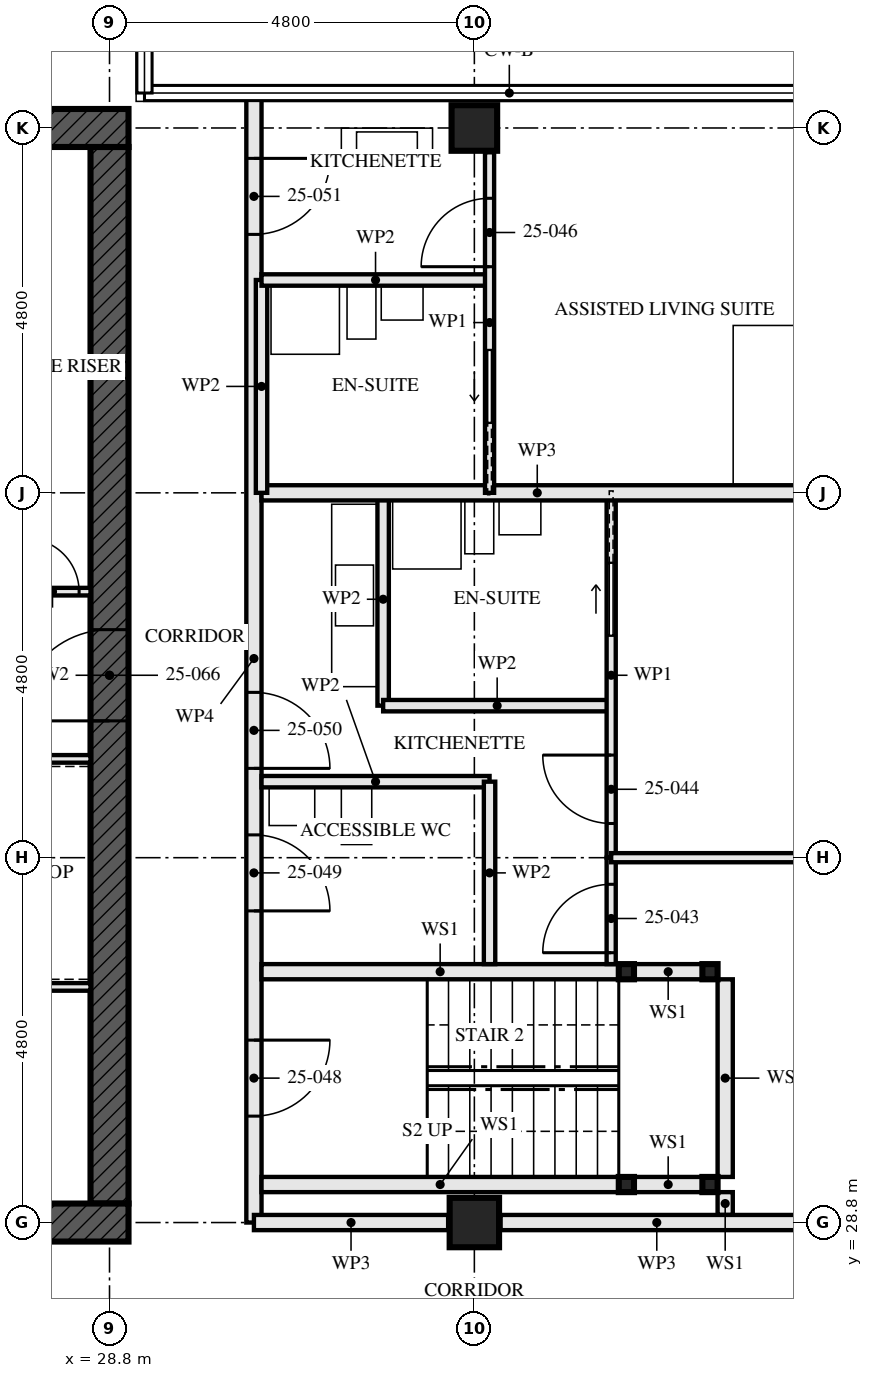
"""IFC4 building model, lengths in metres.
Left out: names, types, materials, properties, quantities, classifications, styles, units other than length and angle.
Written with IfcOpenShell. Run it as: python <this file> out.ifc"""

import sys

from ifc_helpers import new_model, si_unit, direction, frame, frame_2d, origin, origin_2d, place, context, subcontext, project, spatial, rectangle, hollow_rectangle, extrude, element, fill, save


model = new_model("IFC4")
c1 = context("Model", 3, precision=1e-05, world=origin(), true_north=direction((0.0, 1.0)))
c2 = subcontext(c1, "Body", "Model", "MODEL_VIEW")
j1 = project(units=[si_unit("LENGTHUNIT", "METRE"), si_unit("PLANEANGLEUNIT", "RADIAN")], contexts=[c1])
p1 = place(None, origin())
s1 = spatial("IfcSite", under=j1, at=p1, CompositionType="ELEMENT")
p2 = place(p1, origin())
s2 = spatial("IfcBuilding", under=s1, at=p2, CompositionType="ELEMENT")
p3 = place(p2, frame((0.0, 0.0, 94.5)))
s3 = spatial("IfcBuildingStorey", under=s2, at=p3, CompositionType="ELEMENT", Elevation=94.5)
p4 = place(p3, frame((33.6, 28.8, 0.0), z_axis=(0.0, 0.0, 1.0), x_axis=(0.0, 1.0, 0.0)))
e1 = element("IfcColumn", 1, at=p4, inside=s3, PredefinedType="COLUMN", context=c2, shape_type="SweptSolid", body=[
    extrude(hollow_rectangle(XDim=0.65, YDim=0.65, WallThickness=0.05, at=origin_2d()), origin(), (0.0, 0.0, 1.0), 3.5),
])
p5 = place(p3, frame((33.6, 43.2, 0.0), z_axis=(0.0, 0.0, 1.0), x_axis=(0.0, 1.0, 0.0)))
e2 = element("IfcColumn", 2, at=p5, inside=s3, PredefinedType="COLUMN", context=c2, shape_type="SweptSolid", body=[
    extrude(hollow_rectangle(XDim=0.6, YDim=0.6, WallThickness=0.08, at=origin_2d()), origin(), (0.0, 0.0, 1.0), 3.5),
])
p6 = place(p3, frame((14.15, 28.8, -0.17), z_axis=(0.0, 0.0, 1.0), x_axis=(1.0, 0.0, 0.0)))
e3 = element("IfcWall", 3, at=p6, inside=s3, PredefinedType="SHEAR", context=c2, shape_type="SweptSolid", body=[
    extrude(rectangle(XDim=14.9, YDim=0.5, at=frame_2d((7.45, 0.0))), origin(), (0.0, 0.0, 1.0), 3.5),
])
p7 = place(p6, frame((6.85, 0.0, 0.17)))
e4 = element("IfcOpeningElement", 4, at=p7, cuts=e3, PredefinedType="OPENING", context=c2, shape_type="SweptSolid", body=[
    extrude(rectangle(XDim=1.2, YDim=2.1, at=frame_2d((0.6, 1.05))), frame((0.0, 0.26, 0.0), z_axis=(0.0, -1.0, 0.0), x_axis=(1.0, 0.0, 0.0)), (0.0, 0.0, 1.0), 0.521),
])
p8 = place(p3, frame((29.05, 43.2, -0.17), z_axis=(0.0, 0.0, 1.0), x_axis=(-1.0, 0.0, 0.0)))
e5 = element("IfcWall", 5, at=p8, inside=s3, PredefinedType="SHEAR", context=c2, shape_type="SweptSolid", body=[
    extrude(rectangle(XDim=14.9, YDim=0.5, at=frame_2d((7.45, 0.0))), origin(), (0.0, 0.0, 1.0), 3.5),
])
p9 = place(p8, frame((6.85, 0.0, 0.17)))
e6 = element("IfcOpeningElement", 6, at=p9, cuts=e5, PredefinedType="OPENING", context=c2, shape_type="SweptSolid", body=[
    extrude(rectangle(XDim=1.2, YDim=2.1, at=frame_2d((0.6, 1.05))), frame((0.0, 0.26, 0.0), z_axis=(0.0, -1.0, 0.0), x_axis=(1.0, 0.0, 0.0)), (0.0, 0.0, 1.0), 0.521),
])
p10 = place(p3, frame((28.8, 29.05, -0.17), z_axis=(0.0, 0.0, 1.0), x_axis=(0.0, 1.0, 0.0)))
e7 = element("IfcWall", 7, at=p10, inside=s3, PredefinedType="SHEAR", context=c2, shape_type="SweptSolid", body=[
    extrude(rectangle(XDim=13.9, YDim=0.5, at=frame_2d((6.95, 0.0))), origin(), (0.0, 0.0, 1.0), 3.5),
])
p11 = place(p10, frame((6.35, 0.0, 0.17)))
e8 = element("IfcOpeningElement", 8, at=p11, cuts=e7, PredefinedType="OPENING", context=c2, shape_type="SweptSolid", body=[
    extrude(rectangle(XDim=1.2, YDim=2.1, at=frame_2d((0.6, 1.05))), frame((0.0, 0.26, 0.0), z_axis=(0.0, -1.0, 0.0), x_axis=(1.0, 0.0, 0.0)), (0.0, 0.0, 1.0), 0.521),
])
for number, where, z_axis, x_axis in (
    (9, (36.7, 29.3, 0.0), (0.0, 0.0, 1.0), (1.0, 0.0, 0.0)),
    (10, (36.7, 32.1, 0.0), (0.0, 0.0, 1.0), (1.0, 0.0, 0.0)),
    (11, (35.6, 29.3, 0.0), (0.0, 0.0, 1.0), (1.0, 0.0, 0.0)),
    (12, (35.6, 32.1, 0.0), (0.0, 0.0, 1.0), (1.0, 0.0, 0.0)),
):
    element("IfcColumn", number, at=place(p3, frame(where, z_axis=z_axis, x_axis=x_axis)), inside=s3, PredefinedType="COLUMN", context=c2, shape_type="SweptSolid", body=[
        extrude(hollow_rectangle(XDim=0.2, YDim=0.2, WallThickness=0.008, at=origin_2d()), origin(), (0.0, 0.0, 1.0), 3.33),
    ])
p12 = place(p3, frame((36.6, 29.3, 0.0), z_axis=(0.0, 0.0, 1.0), x_axis=(-1.0, 0.0, 0.0)))
e13 = element("IfcWall", 13, at=p12, inside=s3, PredefinedType="SOLIDWALL", context=c2, shape_type="SweptSolid", body=[
    extrude(rectangle(XDim=0.9, YDim=0.2, at=frame_2d((0.45, 0.0))), origin(), (0.0, 0.0, 1.0), 2.99),
])
p13 = place(p3, frame((35.5, 29.3, 0.0), z_axis=(0.0, 0.0, 1.0), x_axis=(-1.0, 0.0, 0.0)))
e14 = element("IfcWall", 14, at=p13, inside=s3, PredefinedType="SOLIDWALL", context=c2, shape_type="SweptSolid", body=[
    extrude(rectangle(XDim=4.7, YDim=0.2, at=frame_2d((2.35, 0.0))), origin(), (0.0, 0.0, 1.0), 2.99),
])
p14 = place(p3, frame((36.6, 32.1, 0.0), z_axis=(0.0, 0.0, 1.0), x_axis=(-1.0, 0.0, 0.0)))
e15 = element("IfcWall", 15, at=p14, inside=s3, PredefinedType="SOLIDWALL", context=c2, shape_type="SweptSolid", body=[
    extrude(rectangle(XDim=0.9, YDim=0.2, at=frame_2d((0.45, 0.0))), origin(), (0.0, 0.0, 1.0), 2.99),
])
p15 = place(p3, frame((35.5, 32.1, 0.0), z_axis=(0.0, 0.0, 1.0), x_axis=(-1.0, 0.0, 0.0)))
e16 = element("IfcWall", 16, at=p15, inside=s3, PredefinedType="SOLIDWALL", context=c2, shape_type="SweptSolid", body=[
    extrude(rectangle(XDim=4.7, YDim=0.2, at=frame_2d((2.35, 0.0))), origin(), (0.0, 0.0, 1.0), 2.99),
])
p16 = place(p3, frame((36.9, 28.9, 0.0), z_axis=(0.0, 0.0, 1.0), x_axis=(0.0, 1.0, 0.0)))
e17 = element("IfcWall", 17, at=p16, inside=s3, PredefinedType="SOLIDWALL", context=c2, shape_type="SweptSolid", body=[
    extrude(rectangle(XDim=0.3, YDim=0.2, at=frame_2d((0.15, 0.0))), origin(), (0.0, 0.0, 1.0), 3.33),
])
p17 = place(p3, frame((36.9, 29.4, 0.0), z_axis=(0.0, 0.0, 1.0), x_axis=(0.0, 1.0, 0.0)))
e18 = element("IfcWall", 18, at=p17, inside=s3, PredefinedType="SOLIDWALL", context=c2, shape_type="SweptSolid", body=[
    extrude(rectangle(XDim=2.6, YDim=0.2, at=frame_2d((1.3, 0.0))), origin(), (0.0, 0.0, 1.0), 3.33),
])
p18 = place(p3, frame((33.8, 32.2, 0.0), z_axis=(0.0, 0.0, 1.0), x_axis=(0.0, 1.0, 0.0)))
e19 = element("IfcWall", 19, at=p18, inside=s3, PredefinedType="PARTITIONING", context=c2, shape_type="SweptSolid", body=[
    extrude(rectangle(XDim=2.4, YDim=0.15, at=frame_2d((1.2, 0.0))), origin(), (0.0, 0.0, 1.0), 2.55),
])
for number, where, z_axis, x_axis in (
    (20, (33.8, 34.6, 0.0), (0.0, 0.0, 1.0), (-1.0, 0.0, 0.0)),
    (21, (35.4, 35.6, 0.0), (0.0, 0.0, 1.0), (-1.0, 0.0, 0.0)),
):
    element("IfcWall", number, at=place(p3, frame(where, z_axis=z_axis, x_axis=x_axis)), inside=s3, PredefinedType="PARTITIONING", context=c2, shape_type="SweptSolid", body=[
        extrude(rectangle(XDim=3.0, YDim=0.15, at=frame_2d((1.5, 0.0))), origin(), (0.0, 0.0, 1.0), 3.33),
    ])
p19 = place(p3, frame((32.4, 35.6, 0.0), z_axis=(0.0, 0.0, 1.0), x_axis=(0.0, 1.0, 0.0)))
e22 = element("IfcWall", 22, at=p19, inside=s3, PredefinedType="PARTITIONING", context=c2, shape_type="SweptSolid", body=[
    extrude(rectangle(XDim=2.8, YDim=0.15, at=frame_2d((1.4, 0.0))), origin(), (0.0, 0.0, 1.0), 3.33),
])
p20 = place(p3, frame((35.4, 32.2, 0.0), z_axis=(0.0, 0.0, 1.0), x_axis=(0.0, 1.0, 0.0)))
e23 = element("IfcWall", 23, at=p20, inside=s3, PredefinedType="PARTITIONING", context=c2, shape_type="SweptSolid", body=[
    extrude(rectangle(XDim=1.4, YDim=0.12, at=frame_2d((0.7, 0.0))), origin(), (0.0, 0.0, 1.0), 3.33),
])
p21 = place(p20, frame((0.15, 0.0, 0.0)))
e24 = element("IfcOpeningElement", 24, at=p21, cuts=e23, PredefinedType="OPENING", context=c2, shape_type="SweptSolid", body=[
    extrude(rectangle(XDim=0.9, YDim=2.1, at=frame_2d((0.45, 1.05))), frame((0.0, 0.071, 0.0), z_axis=(0.0, -1.0, 0.0), x_axis=(1.0, 0.0, 0.0)), (0.0, 0.0, 1.0), 0.141),
])
p22 = place(p3, frame((35.4, 33.6, 0.0), z_axis=(0.0, 0.0, 1.0), x_axis=(0.0, 1.0, 0.0)))
e25 = element("IfcWall", 25, at=p22, inside=s3, PredefinedType="PARTITIONING", context=c2, shape_type="SweptSolid", body=[
    extrude(rectangle(XDim=4.8, YDim=0.12, at=frame_2d((2.4, 0.0))), origin(), (0.0, 0.0, 1.0), 3.33),
])
p23 = place(p22, frame((0.45, 0.0, 0.0)))
e26 = element("IfcOpeningElement", 26, at=p23, cuts=e25, PredefinedType="OPENING", context=c2, shape_type="SweptSolid", body=[
    extrude(rectangle(XDim=0.9, YDim=2.1, at=frame_2d((0.45, 1.05))), frame((0.0, 0.071, 0.0), z_axis=(0.0, -1.0, 0.0), x_axis=(1.0, 0.0, 0.0)), (0.0, 0.0, 1.0), 0.141),
])
p24 = place(p22, frame((2.925, 0.0, 0.0)))
e27 = element("IfcOpeningElement", 27, at=p24, cuts=e25, PredefinedType="OPENING", context=c2, shape_type="SweptSolid", body=[
    extrude(rectangle(XDim=0.95, YDim=2.1, at=frame_2d((0.475, 1.05))), frame((0.0, 0.071, 0.0), z_axis=(0.0, -1.0, 0.0), x_axis=(1.0, 0.0, 0.0)), (0.0, 0.0, 1.0), 0.141),
])
p25 = place(p3, frame((42.855, 33.6, 0.0), z_axis=(0.0, 0.0, 1.0), x_axis=(-1.0, 0.0, 0.0)))
e28 = element("IfcWall", 28, at=p25, inside=s3, PredefinedType="PARTITIONING", context=c2, shape_type="SweptSolid", body=[
    extrude(rectangle(XDim=7.455, YDim=0.12, at=frame_2d((3.728, 0.0))), origin(), (0.0, 0.0, 1.0), 2.55),
])
p26 = place(p3, frame((38.055, 38.4, 0.0), z_axis=(0.0, 0.0, 1.0), x_axis=(-1.0, 0.0, 0.0)))
e29 = element("IfcWall", 29, at=p26, inside=s3, PredefinedType="PARTITIONING", context=c2, shape_type="SweptSolid", body=[
    extrude(rectangle(XDim=7.255, YDim=0.2, at=frame_2d((3.627, 0.0))), origin(), (0.0, 0.0, 1.0), 2.55),
])
p27 = place(p3, frame((33.8, 41.2, 0.0), z_axis=(0.0, 0.0, 1.0), x_axis=(-1.0, 0.0, 0.0)))
e30 = element("IfcWall", 30, at=p27, inside=s3, PredefinedType="PARTITIONING", context=c2, shape_type="SweptSolid", body=[
    extrude(rectangle(XDim=3.0, YDim=0.15, at=frame_2d((1.5, 0.0))), origin(), (0.0, 0.0, 1.0), 3.33),
])
p28 = place(p3, frame((30.8, 38.4, 0.0), z_axis=(0.0, 0.0, 1.0), x_axis=(0.0, 1.0, 0.0)))
e31 = element("IfcWall", 31, at=p28, inside=s3, PredefinedType="PARTITIONING", context=c2, shape_type="SweptSolid", body=[
    extrude(rectangle(XDim=2.8, YDim=0.15, at=frame_2d((1.4, 0.0))), origin(), (0.0, 0.0, 1.0), 3.33),
])
p29 = place(p3, frame((33.8, 38.4, 0.0), z_axis=(0.0, 0.0, 1.0), x_axis=(0.0, 1.0, 0.0)))
e32 = element("IfcWall", 32, at=p29, inside=s3, PredefinedType="PARTITIONING", context=c2, shape_type="SweptSolid", body=[
    extrude(rectangle(XDim=4.48, YDim=0.12, at=frame_2d((2.24, 0.0))), origin(), (0.0, 0.0, 1.0), 3.33),
])
p30 = place(p29, frame((2.975, 0.0, 0.0)))
e33 = element("IfcOpeningElement", 33, at=p30, cuts=e32, PredefinedType="OPENING", context=c2, shape_type="SweptSolid", body=[
    extrude(rectangle(XDim=0.9, YDim=2.1, at=frame_2d((0.45, 1.05))), frame((0.0, 0.071, 0.0), z_axis=(0.0, -1.0, 0.0), x_axis=(1.0, 0.0, 0.0)), (0.0, 0.0, 1.0), 0.141),
])
p31 = place(p29, frame((0.925, 0.0, 0.0)))
e34 = element("IfcOpeningElement", 34, at=p31, cuts=e32, PredefinedType="OPENING", context=c2, shape_type="SweptSolid", body=[
    extrude(rectangle(XDim=0.95, YDim=2.1, at=frame_2d((0.475, 1.05))), frame((0.0, 0.071, 0.0), z_axis=(0.0, -1.0, 0.0), x_axis=(1.0, 0.0, 0.0)), (0.0, 0.0, 1.0), 0.141),
])
p32 = place(p3, frame((30.7, 28.8, 0.0), z_axis=(0.0, 0.0, 1.0), x_axis=(0.0, 1.0, 0.0)))
e35 = element("IfcWall", 35, at=p32, inside=s3, PredefinedType="PARTITIONING", context=c2, shape_type="SweptSolid", body=[
    extrude(rectangle(XDim=14.84, YDim=0.2, at=frame_2d((7.42, 0.0))), origin(), (0.0, 0.0, 1.0), 2.32),
])
p33 = place(p32, frame((1.4, 0.0, 0.0)))
e36 = element("IfcOpeningElement", 36, at=p33, cuts=e35, PredefinedType="OPENING", context=c2, shape_type="SweptSolid", body=[
    extrude(rectangle(XDim=1.0, YDim=2.1, at=frame_2d((0.5, 1.05))), frame((0.0, 0.111, 0.0), z_axis=(0.0, -1.0, 0.0), x_axis=(1.0, 0.0, 0.0)), (0.0, 0.0, 1.0), 0.221),
])
p34 = place(p32, frame((4.1, 0.0, 0.0)))
e37 = element("IfcOpeningElement", 37, at=p34, cuts=e35, PredefinedType="OPENING", context=c2, shape_type="SweptSolid", body=[
    extrude(rectangle(XDim=1.0, YDim=2.1, at=frame_2d((0.5, 1.05))), frame((0.0, 0.111, 0.0), z_axis=(0.0, -1.0, 0.0), x_axis=(1.0, 0.0, 0.0)), (0.0, 0.0, 1.0), 0.221),
])
p35 = place(p32, frame((5.975, 0.0, 0.0)))
e38 = element("IfcOpeningElement", 38, at=p35, cuts=e35, PredefinedType="OPENING", context=c2, shape_type="SweptSolid", body=[
    extrude(rectangle(XDim=1.0, YDim=2.1, at=frame_2d((0.5, 1.05))), frame((0.0, 0.111, 0.0), z_axis=(0.0, -1.0, 0.0), x_axis=(1.0, 0.0, 0.0)), (0.0, 0.0, 1.0), 0.221),
])
p36 = place(p32, frame((13.0, 0.0, 0.0)))
e39 = element("IfcOpeningElement", 39, at=p36, cuts=e35, PredefinedType="OPENING", context=c2, shape_type="SweptSolid", body=[
    extrude(rectangle(XDim=1.0, YDim=2.1, at=frame_2d((0.5, 1.05))), frame((0.0, 0.111, 0.0), z_axis=(0.0, -1.0, 0.0), x_axis=(1.0, 0.0, 0.0)), (0.0, 0.0, 1.0), 0.221),
])
p37 = place(p3, frame((23.05, 34.9, 0.0), z_axis=(0.0, 0.0, 1.0), x_axis=(1.0, 0.0, 0.0)))
e40 = element("IfcWall", 40, at=p37, inside=s3, PredefinedType="SOLIDWALL", context=c2, shape_type="SweptSolid", body=[
    extrude(rectangle(XDim=5.5, YDim=0.1, at=frame_2d((2.75, 0.0))), origin(), (0.0, 0.0, 1.0), 3.33),
])
p38 = place(p3, frame((22.65, 37.1, 0.0), z_axis=(0.0, 0.0, 1.0), x_axis=(1.0, 0.0, 0.0)))
e41 = element("IfcWall", 41, at=p38, inside=s3, PredefinedType="SOLIDWALL", context=c2, shape_type="SweptSolid", body=[
    extrude(rectangle(XDim=5.9, YDim=0.1, at=frame_2d((2.95, 0.0))), origin(), (0.0, 0.0, 1.0), 3.33),
])
p39 = place(p38, frame((3.5, 0.0, 0.0)))
e42 = element("IfcOpeningElement", 42, at=p39, cuts=e41, PredefinedType="OPENING", context=c2, shape_type="SweptSolid", body=[
    extrude(rectangle(XDim=0.9, YDim=2.1, at=frame_2d((0.45, 1.05))), frame((0.0, 0.061, 0.0), z_axis=(0.0, -1.0, 0.0), x_axis=(1.0, 0.0, 0.0)), (0.0, 0.0, 1.0), 0.121),
])
p40 = place(p38, frame((5.05, 0.0, 0.0)))
e43 = element("IfcOpeningElement", 43, at=p40, cuts=e41, PredefinedType="OPENING", context=c2, shape_type="SweptSolid", body=[
    extrude(rectangle(XDim=0.7, YDim=2.1, at=frame_2d((0.35, 1.05))), frame((0.0, 0.061, 0.0), z_axis=(0.0, -1.0, 0.0), x_axis=(1.0, 0.0, 0.0)), (0.0, 0.0, 1.0), 0.121),
])
p41 = place(p3, frame((23.15, 31.9, 0.0), z_axis=(0.0, 0.0, 1.0), x_axis=(1.0, 0.0, 0.0)))
e44 = element("IfcWall", 44, at=p41, inside=s3, PredefinedType="SOLIDWALL", context=c2, shape_type="SweptSolid", body=[
    extrude(rectangle(XDim=5.4, YDim=0.1, at=frame_2d((2.7, 0.0))), origin(), (0.0, 0.0, 1.0), 3.33),
])
p42 = place(p3, frame((38.055, 28.8, 0.0), z_axis=(0.0, 0.0, 1.0), x_axis=(-1.0, 0.0, 0.0)))
e45 = element("IfcWall", 45, at=p42, inside=s3, PredefinedType="PARTITIONING", context=c2, shape_type="SweptSolid", body=[
    extrude(rectangle(XDim=4.11, YDim=0.2, at=frame_2d((2.055, 0.0))), origin(), (0.0, 0.0, 1.0), 2.32),
])
p43 = place(p3, frame((33.255, 28.8, 0.0), z_axis=(0.0, 0.0, 1.0), x_axis=(-1.0, 0.0, 0.0)))
e46 = element("IfcWall", 46, at=p43, inside=s3, PredefinedType="PARTITIONING", context=c2, shape_type="SweptSolid", body=[
    extrude(rectangle(XDim=2.555, YDim=0.2, at=frame_2d((1.277, 0.0))), origin(), (0.0, 0.0, 1.0), 2.32),
])
p44 = place(p21, origin())
e47 = element("IfcDoor", 47, at=p44, inside=s3, OperationType="SINGLE_SWING_RIGHT", PredefinedType="DOOR", context=c2, shape_type="SweptSolid", body=[
    extrude(rectangle(XDim=0.9, YDim=2.1, at=frame_2d((0.45, 1.05))), frame((0.0, 0.022, 0.0), z_axis=(0.0, -1.0, 0.0), x_axis=(1.0, 0.0, 0.0)), (0.0, 0.0, 1.0), 0.044),
])
fill(e24, e47)
p45 = place(p23, origin())
e48 = element("IfcDoor", 48, at=p45, inside=s3, OperationType="SINGLE_SWING_LEFT", PredefinedType="DOOR", context=c2, shape_type="SweptSolid", body=[
    extrude(rectangle(XDim=0.9, YDim=2.1, at=frame_2d((0.45, 1.05))), frame((0.0, 0.022, 0.0), z_axis=(0.0, -1.0, 0.0), x_axis=(1.0, 0.0, 0.0)), (0.0, 0.0, 1.0), 0.044),
])
fill(e26, e48)
p46 = place(p24, origin())
e49 = element("IfcDoor", 49, at=p46, inside=s3, OperationType="SLIDING_TO_LEFT", PredefinedType="DOOR", context=c2, shape_type="SweptSolid", body=[
    extrude(rectangle(XDim=0.95, YDim=2.1, at=frame_2d((0.475, 1.05))), frame((0.0, 0.022, 0.0), z_axis=(0.0, -1.0, 0.0), x_axis=(1.0, 0.0, 0.0)), (0.0, 0.0, 1.0), 0.044),
])
fill(e27, e49)
p47 = place(p30, origin())
e50 = element("IfcDoor", 50, at=p47, inside=s3, OperationType="SINGLE_SWING_RIGHT", PredefinedType="DOOR", context=c2, shape_type="SweptSolid", body=[
    extrude(rectangle(XDim=0.9, YDim=2.1, at=frame_2d((0.45, 1.05))), frame((0.0, 0.022, 0.0), z_axis=(0.0, -1.0, 0.0), x_axis=(1.0, 0.0, 0.0)), (0.0, 0.0, 1.0), 0.044),
])
fill(e33, e50)
p48 = place(p31, origin())
e51 = element("IfcDoor", 51, at=p48, inside=s3, OperationType="SLIDING_TO_RIGHT", PredefinedType="DOOR", context=c2, shape_type="SweptSolid", body=[
    extrude(rectangle(XDim=0.95, YDim=2.1, at=frame_2d((0.475, 1.05))), frame((0.0, 0.022, 0.0), z_axis=(0.0, -1.0, 0.0), x_axis=(1.0, 0.0, 0.0)), (0.0, 0.0, 1.0), 0.044),
])
fill(e34, e51)
p49 = place(p33, frame((1.0, 0.0, 0.0), z_axis=(0.0, 0.0, 1.0), x_axis=(-1.0, 0.0, 0.0)))
e52 = element("IfcDoor", 52, at=p49, inside=s3, OperationType="SINGLE_SWING_RIGHT", PredefinedType="DOOR", context=c2, shape_type="SweptSolid", body=[
    extrude(rectangle(XDim=1.0, YDim=2.1, at=frame_2d((0.5, 1.05))), frame((0.0, 0.032, 0.0), z_axis=(0.0, -1.0, 0.0), x_axis=(1.0, 0.0, 0.0)), (0.0, 0.0, 1.0), 0.064),
])
fill(e36, e52)
p50 = place(p34, frame((1.0, 0.0, 0.0), z_axis=(0.0, 0.0, 1.0), x_axis=(-1.0, 0.0, 0.0)))
e53 = element("IfcDoor", 53, at=p50, inside=s3, OperationType="SINGLE_SWING_LEFT", PredefinedType="DOOR", context=c2, shape_type="SweptSolid", body=[
    extrude(rectangle(XDim=1.0, YDim=2.1, at=frame_2d((0.5, 1.05))), frame((0.0, 0.027, 0.0), z_axis=(0.0, -1.0, 0.0), x_axis=(1.0, 0.0, 0.0)), (0.0, 0.0, 1.0), 0.054),
])
fill(e37, e53)
p51 = place(p35, frame((1.0, 0.0, 0.0), z_axis=(0.0, 0.0, 1.0), x_axis=(-1.0, 0.0, 0.0)))
e54 = element("IfcDoor", 54, at=p51, inside=s3, OperationType="SINGLE_SWING_LEFT", PredefinedType="DOOR", context=c2, shape_type="SweptSolid", body=[
    extrude(rectangle(XDim=1.0, YDim=2.1, at=frame_2d((0.5, 1.05))), frame((0.0, 0.027, 0.0), z_axis=(0.0, -1.0, 0.0), x_axis=(1.0, 0.0, 0.0)), (0.0, 0.0, 1.0), 0.054),
])
fill(e38, e54)
p52 = place(p36, frame((1.0, 0.0, 0.0), z_axis=(0.0, 0.0, 1.0), x_axis=(-1.0, 0.0, 0.0)))
e55 = element("IfcDoor", 55, at=p52, inside=s3, OperationType="SINGLE_SWING_RIGHT", PredefinedType="DOOR", context=c2, shape_type="SweptSolid", body=[
    extrude(rectangle(XDim=1.0, YDim=2.1, at=frame_2d((0.5, 1.05))), frame((0.0, 0.027, 0.0), z_axis=(0.0, -1.0, 0.0), x_axis=(1.0, 0.0, 0.0)), (0.0, 0.0, 1.0), 0.054),
])
fill(e39, e55)
p53 = place(p40, origin())
e56 = element("IfcDoor", 56, at=p53, inside=s3, OperationType="SINGLE_SWING_RIGHT", PredefinedType="DOOR", context=c2, shape_type="SweptSolid", body=[
    extrude(rectangle(XDim=0.7, YDim=2.1, at=frame_2d((0.35, 1.05))), frame((0.0, 0.027, 0.0), z_axis=(0.0, -1.0, 0.0), x_axis=(1.0, 0.0, 0.0)), (0.0, 0.0, 1.0), 0.054),
])
fill(e43, e56)
p54 = place(p11, origin())
e57 = element("IfcDoor", 57, at=p54, inside=s3, OperationType="SINGLE_SWING_LEFT", PredefinedType="DOOR", context=c2, shape_type="SweptSolid", body=[
    extrude(rectangle(XDim=1.2, YDim=2.1, at=frame_2d((0.6, 1.05))), frame((0.0, 0.027, 0.0), z_axis=(0.0, -1.0, 0.0), x_axis=(1.0, 0.0, 0.0)), (0.0, 0.0, 1.0), 0.054),
])
fill(e8, e57)
save(model, sys.argv[1])
